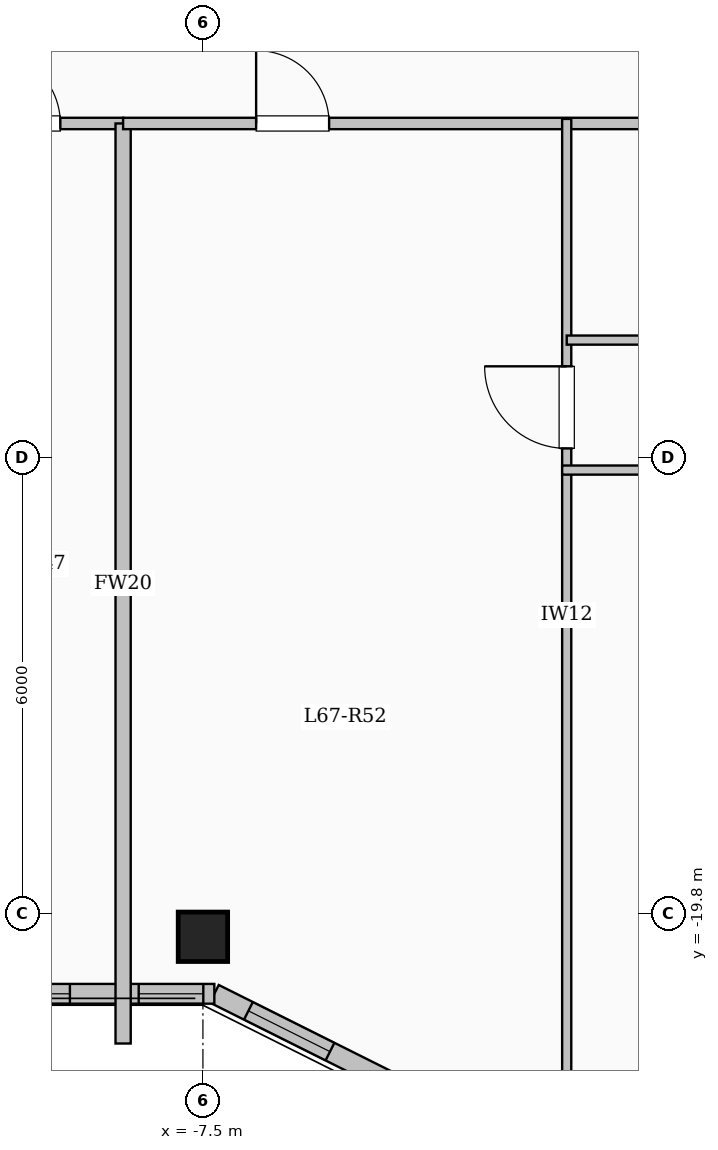
"""IFC4 building model, lengths in metres.
Left out: names, types, materials, properties, quantities, classifications, styles, units other than length and angle.
Written with IfcOpenShell. Run it as: python <this file> out.ifc"""

import sys

from ifc_helpers import new_model, si_unit, direction, frame, frame_2d, origin, origin_2d, place, context, subcontext, project, spatial, rectangle, extrude, element, fill, save


model = new_model("IFC4")
c1 = context("Model", 3, precision=1e-05, world=origin(), true_north=direction((0.0, 1.0)))
c2 = subcontext(c1, "Body", "Model", "MODEL_VIEW")
j1 = project(units=[si_unit("LENGTHUNIT", "METRE"), si_unit("PLANEANGLEUNIT", "RADIAN")], contexts=[c1])
p1 = place(None, origin())
s1 = spatial("IfcSite", under=j1, at=p1, CompositionType="ELEMENT")
p2 = place(p1, origin())
s2 = spatial("IfcBuilding", under=s1, at=p2, CompositionType="ELEMENT")
p3 = place(p2, frame((0.0, 0.0, 248.2)))
s3 = spatial("IfcBuildingStorey", under=s2, at=p3, CompositionType="ELEMENT", Elevation=248.2)
p4 = place(p3, frame((-7.5, -20.1, 0.0), z_axis=(0.0, 0.0, 1.0), x_axis=(1.0, 0.0, 0.0)))
e1 = element("IfcColumn", 1, at=p4, inside=s3, PredefinedType="COLUMN", context=c2, shape_type="SweptSolid", body=[
    extrude(rectangle(XDim=0.65, YDim=0.65, at=origin_2d()), origin(), (0.0, 0.0, 1.0), 3.35),
])
p5 = place(p3, frame((-4.35, -22.35, 0.0), z_axis=(0.0, 0.0, 1.0), x_axis=(-0.894427191, 0.4472135955, 0.0)))
e2 = element("IfcWall", 2, at=p5, inside=s3, PredefinedType="SOLIDWALL", context=c2, shape_type="SweptSolid", body=[
    extrude(rectangle(XDim=3.354, YDim=0.26, at=frame_2d((1.677, 0.0))), origin(), (0.0, 0.0, 1.0), 3.1),
])
p6 = place(p5, frame((1.653, 0.0, 0.95)))
e3 = element("IfcOpeningElement", 3, at=p6, cuts=e2, PredefinedType="OPENING", context=c2, shape_type="SweptSolid", body=[
    extrude(rectangle(XDim=1.2, YDim=1.5, at=frame_2d((0.6, 0.75))), frame((0.0, 0.14, 0.0), z_axis=(0.0, -1.0, 0.0), x_axis=(1.0, 0.0, 0.0)), (0.0, 0.0, 1.0), 0.28),
])
p7 = place(p3, frame((-7.35, -20.85, 0.0), z_axis=(0.0, 0.0, 1.0), x_axis=(-1.0, 0.0, 0.0)))
e4 = element("IfcWall", 4, at=p7, inside=s3, PredefinedType="SOLIDWALL", context=c2, shape_type="SweptSolid", body=[
    extrude(rectangle(XDim=10.5, YDim=0.26, at=frame_2d((5.25, 0.0))), origin(), (0.0, 0.0, 1.0), 3.1),
])
p8 = place(p7, frame((0.145, 0.0, 0.95)))
e5 = element("IfcOpeningElement", 5, at=p8, cuts=e4, PredefinedType="OPENING", context=c2, shape_type="SweptSolid", body=[
    extrude(rectangle(XDim=0.85, YDim=1.5, at=frame_2d((0.425, 0.75))), frame((0.0, 0.14, 0.0), z_axis=(0.0, -1.0, 0.0), x_axis=(1.0, 0.0, 0.0)), (0.0, 0.0, 1.0), 0.28),
])
p9 = place(p7, frame((1.9, 0.0, 0.95)))
e6 = element("IfcOpeningElement", 6, at=p9, cuts=e4, PredefinedType="OPENING", context=c2, shape_type="SweptSolid", body=[
    extrude(rectangle(XDim=1.2, YDim=1.5, at=frame_2d((0.6, 0.75))), frame((0.0, 0.14, 0.0), z_axis=(0.0, -1.0, 0.0), x_axis=(1.0, 0.0, 0.0)), (0.0, 0.0, 1.0), 0.28),
])
p10 = place(p7, frame((4.8, 0.0, 0.95)))
e7 = element("IfcOpeningElement", 7, at=p10, cuts=e4, PredefinedType="OPENING", context=c2, shape_type="SweptSolid", body=[
    extrude(rectangle(XDim=1.35, YDim=1.55, at=frame_2d((0.675, 0.775))), frame((0.0, 0.14, 0.0), z_axis=(0.0, -1.0, 0.0), x_axis=(1.0, 0.0, 0.0)), (0.0, 0.0, 1.0), 0.28),
])
p11 = place(p7, frame((7.975, 0.0, 0.9)))
e8 = element("IfcOpeningElement", 8, at=p11, cuts=e4, PredefinedType="OPENING", context=c2, shape_type="SweptSolid", body=[
    extrude(rectangle(XDim=1.65, YDim=1.6, at=frame_2d((0.825, 0.8))), frame((0.0, 0.14, 0.0), z_axis=(0.0, -1.0, 0.0), x_axis=(1.0, 0.0, 0.0)), (0.0, 0.0, 1.0), 0.28),
])
p12 = place(p3, frame((-17.75, -9.4, 0.0), z_axis=(0.0, 0.0, 1.0), x_axis=(1.0, 0.0, 0.0)))
e9 = element("IfcWall", 9, at=p12, inside=s3, PredefinedType="PARTITIONING", context=c2, shape_type="SweptSolid", body=[
    extrude(rectangle(XDim=9.2, YDim=0.15, at=frame_2d((4.6, 0.0))), origin(), (0.0, 0.0, 1.0), 3.1),
])
p13 = place(p12, frame((1.142, 0.0, 0.0)))
e10 = element("IfcOpeningElement", 10, at=p13, cuts=e9, PredefinedType="OPENING", context=c2, shape_type="SweptSolid", body=[
    extrude(rectangle(XDim=0.95, YDim=2.15, at=frame_2d((0.475, 1.075))), frame((0.0, 0.085, 0.0), z_axis=(0.0, -1.0, 0.0), x_axis=(1.0, 0.0, 0.0)), (0.0, 0.0, 1.0), 0.17),
])
p14 = place(p12, frame((4.466, 0.0, 0.0)))
e11 = element("IfcOpeningElement", 11, at=p14, cuts=e9, PredefinedType="OPENING", context=c2, shape_type="SweptSolid", body=[
    extrude(rectangle(XDim=0.95, YDim=2.15, at=frame_2d((0.475, 1.075))), frame((0.0, 0.085, 0.0), z_axis=(0.0, -1.0, 0.0), x_axis=(1.0, 0.0, 0.0)), (0.0, 0.0, 1.0), 0.17),
])
p15 = place(p12, frame((7.424, 0.0, 0.0)))
e12 = element("IfcOpeningElement", 12, at=p15, cuts=e9, PredefinedType="OPENING", context=c2, shape_type="SweptSolid", body=[
    extrude(rectangle(XDim=0.95, YDim=2.15, at=frame_2d((0.475, 1.075))), frame((0.0, 0.085, 0.0), z_axis=(0.0, -1.0, 0.0), x_axis=(1.0, 0.0, 0.0)), (0.0, 0.0, 1.0), 0.17),
])
p16 = place(p3, frame((-8.55, -21.504, 0.0), z_axis=(0.0, 0.0, 1.0), x_axis=(0.0, 1.0, 0.0)))
e13 = element("IfcWall", 13, at=p16, inside=s3, PredefinedType="SOLIDWALL", context=c2, shape_type="SweptSolid", body=[
    extrude(rectangle(XDim=12.104, YDim=0.2, at=frame_2d((6.052, 0.0))), origin(), (0.0, 0.0, 1.0), 3.1),
])
p17 = place(p3, frame((-8.55, -9.4, 0.0), z_axis=(0.0, 0.0, 1.0), x_axis=(1.0, 0.0, 0.0)))
e14 = element("IfcWall", 14, at=p17, inside=s3, PredefinedType="PARTITIONING", context=c2, shape_type="SweptSolid", body=[
    extrude(rectangle(XDim=17.1, YDim=0.15, at=frame_2d((8.55, 0.0))), origin(), (0.0, 0.0, 1.0), 3.1),
])
p18 = place(p17, frame((1.75, 0.0, 0.0)))
e15 = element("IfcOpeningElement", 15, at=p18, cuts=e14, PredefinedType="OPENING", context=c2, shape_type="SweptSolid", body=[
    extrude(rectangle(XDim=0.96, YDim=2.15, at=frame_2d((0.48, 1.075))), frame((0.0, 0.085, 0.0), z_axis=(0.0, -1.0, 0.0), x_axis=(1.0, 0.0, 0.0)), (0.0, 0.0, 1.0), 0.17),
])
p19 = place(p3, frame((-2.714, -22.38, 0.0), z_axis=(0.0, 0.0, 1.0), x_axis=(0.0, 1.0, 0.0)))
e16 = element("IfcWall", 16, at=p19, inside=s3, PredefinedType="PARTITIONING", context=c2, shape_type="SweptSolid", body=[
    extrude(rectangle(XDim=13.04, YDim=0.12, at=frame_2d((6.52, 0.0))), origin(), (0.0, 0.0, 1.0), 3.1),
])
p20 = place(p19, frame((8.705, 0.0, 0.0)))
e17 = element("IfcOpeningElement", 17, at=p20, cuts=e16, PredefinedType="OPENING", context=c2, shape_type="SweptSolid", body=[
    extrude(rectangle(XDim=1.08, YDim=2.15, at=frame_2d((0.54, 1.075))), frame((0.0, 0.07, 0.0), z_axis=(0.0, -1.0, 0.0), x_axis=(1.0, 0.0, 0.0)), (0.0, 0.0, 1.0), 0.14),
])
p21 = place(p3, frame((-2.714, -12.25, 0.0), z_axis=(0.0, 0.0, 1.0), x_axis=(1.0, 0.0, 0.0)))
e18 = element("IfcWall", 18, at=p21, inside=s3, PredefinedType="PARTITIONING", context=c2, shape_type="SweptSolid", body=[
    extrude(rectangle(XDim=5.485, YDim=0.12, at=frame_2d((2.743, 0.0))), origin(), (0.0, 0.0, 1.0), 2.785),
])
p22 = place(p21, frame((2.302, 0.0, 0.0)))
e19 = element("IfcOpeningElement", 19, at=p22, cuts=e18, PredefinedType="OPENING", context=c2, shape_type="SweptSolid", body=[
    extrude(rectangle(XDim=0.88, YDim=2.1, at=frame_2d((0.44, 1.05))), frame((0.0, 0.07, 0.0), z_axis=(0.0, -1.0, 0.0), x_axis=(1.0, 0.0, 0.0)), (0.0, 0.0, 1.0), 0.14),
])
p23 = place(p3, frame((-2.774, -13.96, 0.0), z_axis=(0.0, 0.0, 1.0), x_axis=(1.0, 0.0, 0.0)))
e20 = element("IfcWall", 20, at=p23, inside=s3, PredefinedType="PARTITIONING", context=c2, shape_type="SweptSolid", body=[
    extrude(rectangle(XDim=11.384, YDim=0.12, at=frame_2d((5.692, 0.0))), origin(), (0.0, 0.0, 1.0), 2.785),
])
p24 = place(p23, frame((1.426, 0.0, 0.0)))
e21 = element("IfcOpeningElement", 21, at=p24, cuts=e20, PredefinedType="OPENING", context=c2, shape_type="SweptSolid", body=[
    extrude(rectangle(XDim=0.88, YDim=2.1, at=frame_2d((0.44, 1.05))), frame((0.0, 0.07, 0.0), z_axis=(0.0, -1.0, 0.0), x_axis=(1.0, 0.0, 0.0)), (0.0, 0.0, 1.0), 0.14),
])
p25 = place(p23, frame((5.157, 0.0, 0.0)))
e22 = element("IfcOpeningElement", 22, at=p25, cuts=e20, PredefinedType="OPENING", context=c2, shape_type="SweptSolid", body=[
    extrude(rectangle(XDim=0.88, YDim=2.1, at=frame_2d((0.44, 1.05))), frame((0.0, 0.07, 0.0), z_axis=(0.0, -1.0, 0.0), x_axis=(1.0, 0.0, 0.0)), (0.0, 0.0, 1.0), 0.14),
])
p26 = place(p23, frame((8.888, 0.0, 0.0)))
e23 = element("IfcOpeningElement", 23, at=p26, cuts=e20, PredefinedType="OPENING", context=c2, shape_type="SweptSolid", body=[
    extrude(rectangle(XDim=0.88, YDim=2.1, at=frame_2d((0.44, 1.05))), frame((0.0, 0.07, 0.0), z_axis=(0.0, -1.0, 0.0), x_axis=(1.0, 0.0, 0.0)), (0.0, 0.0, 1.0), 0.14),
])
p27 = place(p6, origin())
e24 = element("IfcWindow", 24, at=p27, inside=s3, PartitioningType="SINGLE_PANEL", PredefinedType="WINDOW", context=c2, shape_type="SweptSolid", body=[
    extrude(rectangle(XDim=1.2, YDim=1.5, at=frame_2d((0.6, 0.75))), frame((0.0, 0.03, 0.0), z_axis=(0.0, -1.0, 0.0), x_axis=(1.0, 0.0, 0.0)), (0.0, 0.0, 1.0), 0.06),
])
fill(e3, e24)
p28 = place(p8, origin())
e25 = element("IfcWindow", 25, at=p28, inside=s3, PartitioningType="SINGLE_PANEL", PredefinedType="WINDOW", context=c2, shape_type="SweptSolid", body=[
    extrude(rectangle(XDim=0.85, YDim=1.5, at=frame_2d((0.425, 0.75))), frame((0.0, 0.03, 0.0), z_axis=(0.0, -1.0, 0.0), x_axis=(1.0, 0.0, 0.0)), (0.0, 0.0, 1.0), 0.06),
])
fill(e5, e25)
p29 = place(p9, origin())
e26 = element("IfcWindow", 26, at=p29, inside=s3, PartitioningType="SINGLE_PANEL", PredefinedType="WINDOW", context=c2, shape_type="SweptSolid", body=[
    extrude(rectangle(XDim=1.2, YDim=1.5, at=frame_2d((0.6, 0.75))), frame((0.0, 0.03, 0.0), z_axis=(0.0, -1.0, 0.0), x_axis=(1.0, 0.0, 0.0)), (0.0, 0.0, 1.0), 0.06),
])
fill(e6, e26)
p30 = place(p15, origin())
e27 = element("IfcDoor", 27, at=p30, inside=s3, OperationType="SINGLE_SWING_LEFT", PredefinedType="DOOR", context=c2, shape_type="SweptSolid", body=[
    extrude(rectangle(XDim=0.95, YDim=2.15, at=frame_2d((0.475, 1.075))), frame((0.0, 0.025, 0.0), z_axis=(0.0, -1.0, 0.0), x_axis=(1.0, 0.0, 0.0)), (0.0, 0.0, 1.0), 0.05),
])
fill(e12, e27)
p31 = place(p18, origin())
e28 = element("IfcDoor", 28, at=p31, inside=s3, OperationType="SINGLE_SWING_LEFT", PredefinedType="DOOR", context=c2, shape_type="SweptSolid", body=[
    extrude(rectangle(XDim=0.96, YDim=2.15, at=frame_2d((0.48, 1.075))), frame((0.0, 0.025, 0.0), z_axis=(0.0, -1.0, 0.0), x_axis=(1.0, 0.0, 0.0)), (0.0, 0.0, 1.0), 0.05),
])
fill(e15, e28)
p32 = place(p20, origin())
e29 = element("IfcDoor", 29, at=p32, inside=s3, OperationType="SINGLE_SWING_RIGHT", PredefinedType="DOOR", context=c2, shape_type="SweptSolid", body=[
    extrude(rectangle(XDim=1.08, YDim=2.15, at=frame_2d((0.54, 1.075))), frame((0.0, 0.025, 0.0), z_axis=(0.0, -1.0, 0.0), x_axis=(1.0, 0.0, 0.0)), (0.0, 0.0, 1.0), 0.05),
])
fill(e17, e29)
save(model, sys.argv[1])
